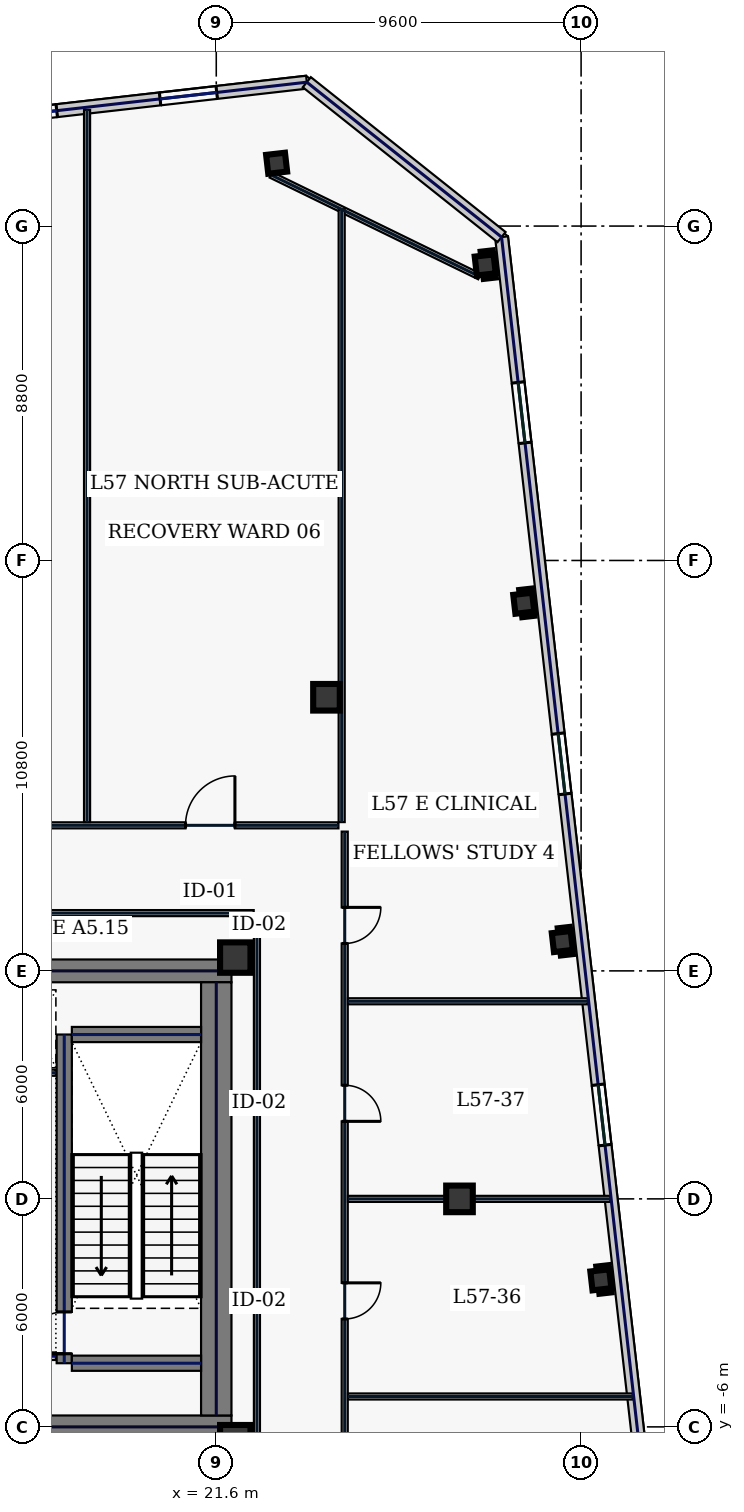
"""IFC4 building model, lengths in metres.
Left out: names, types, materials, properties, quantities, classifications, styles, units other than length and angle.
Written with IfcOpenShell. Run it as: python <this file> out.ifc"""

import sys

from ifc_helpers import new_model, si_unit, direction, frame, frame_2d, origin, origin_2d, place, context, subcontext, project, spatial, rectangle, hollow_rectangle, extrude, element, fill, save


model = new_model("IFC4")
c1 = context("Model", 3, precision=1e-05, world=origin(), true_north=direction((0.0, 1.0)))
c2 = subcontext(c1, "Body", "Model", "MODEL_VIEW")
j1 = project(units=[si_unit("LENGTHUNIT", "METRE"), si_unit("PLANEANGLEUNIT", "RADIAN")], contexts=[c1])
p1 = place(None, origin())
s1 = spatial("IfcSite", under=j1, at=p1, CompositionType="ELEMENT")
p2 = place(p1, origin())
s2 = spatial("IfcBuilding", under=s1, at=p2, CompositionType="ELEMENT")
p3 = place(p2, frame((0.0, 0.0, 247.0)))
s3 = spatial("IfcBuildingStorey", under=s2, at=p3, CompositionType="ELEMENT", Elevation=247.0)
for number, where, z_axis, x_axis in (
    (1, (10.5, 6.0, 0.0), (0.0, 0.0, 1.0), (1.0, 0.0, 0.0)),
    (2, (10.5, -6.0, 0.0), (0.0, 0.0, 1.0), (1.0, 0.0, 0.0)),
):
    element("IfcWall", number, at=place(p3, frame(where, z_axis=z_axis, x_axis=x_axis)), inside=s3, PredefinedType="SHEAR", context=c2, shape_type="SweptSolid", body=[
        extrude(rectangle(XDim=11.5, YDim=0.6, at=frame_2d((5.75, 0.0))), origin(), (0.0, 0.0, 1.0), 3.74),
    ])
p4 = place(p3, frame((21.6, -5.7, 0.0), z_axis=(0.0, 0.0, 1.0), x_axis=(0.0, 1.0, 0.0)))
e3 = element("IfcWall", 3, at=p4, inside=s3, PredefinedType="SHEAR", context=c2, shape_type="SweptSolid", body=[
    extrude(rectangle(XDim=11.4, YDim=0.8, at=frame_2d((5.7, 0.0))), origin(), (0.0, 0.0, 1.0), 3.74),
])
p5 = place(p3, frame((17.6, -4.325, 0.0), z_axis=(0.0, 0.0, 1.0), x_axis=(0.0, 1.0, 0.0)))
e4 = element("IfcWall", 4, at=p5, inside=s3, PredefinedType="SHEAR", context=c2, shape_type="SweptSolid", body=[
    extrude(rectangle(XDim=8.65, YDim=0.4, at=frame_2d((4.325, 0.0))), origin(), (0.0, 0.0, 1.0), 3.74),
])
p6 = place(p5, frame((0.25, 0.0, 0.0)))
e5 = element("IfcOpeningElement", 5, at=p6, cuts=e4, PredefinedType="OPENING", context=c2, shape_type="SweptSolid", body=[
    extrude(rectangle(XDim=1.1, YDim=2.2, at=frame_2d((0.55, 1.1))), frame((0.0, 0.21, 0.0), z_axis=(0.0, -1.0, 0.0), x_axis=(1.0, 0.0, 0.0)), (0.0, 0.0, 1.0), 0.42),
])
for number, where, z_axis, x_axis in (
    (6, (17.8, -4.325, 0.0), (0.0, 0.0, 1.0), (1.0, 0.0, 0.0)),
    (7, (17.8, 4.325, 0.0), (0.0, 0.0, 1.0), (1.0, 0.0, 0.0)),
):
    element("IfcWall", number, at=place(p3, frame(where, z_axis=z_axis, x_axis=x_axis)), inside=s3, PredefinedType="SHEAR", context=c2, shape_type="SweptSolid", body=[
        extrude(rectangle(XDim=3.4, YDim=0.4, at=frame_2d((1.7, 0.0))), origin(), (0.0, 0.0, 1.0), 3.74),
    ])
for number, where, z_axis, x_axis in (
    (8, (22.1, -6.35, 0.0), (0.0, 0.0, 1.0), (1.0, 0.0, 0.0)),
    (9, (22.1, 6.35, 0.0), (0.0, 0.0, 1.0), (1.0, 0.0, 0.0)),
):
    element("IfcColumn", number, at=place(p3, frame(where, z_axis=z_axis, x_axis=x_axis)), inside=s3, PredefinedType="COLUMN", context=c2, shape_type="SweptSolid", body=[
        extrude(hollow_rectangle(XDim=0.8, YDim=0.8, WallThickness=0.036, at=origin_2d()), origin(), (0.0, 0.0, 1.0), 3.74),
    ])
for number, where, z_axis, x_axis in (
    (10, (24.5, 13.2, 0.0), (0.0, 0.0, 1.0), (1.0, 0.0, 0.0)),
    (11, (28.0, 0.0, 0.0), (0.0, 0.0, 1.0), (1.0, 0.0, 0.0)),
):
    element("IfcColumn", number, at=place(p3, frame(where, z_axis=z_axis, x_axis=x_axis)), inside=s3, PredefinedType="COLUMN", context=c2, shape_type="SweptSolid", body=[
        extrude(hollow_rectangle(XDim=0.7, YDim=0.7, WallThickness=0.032, at=origin_2d()), origin(), (0.0, 0.0, 1.0), 3.74),
    ])
for number, where, z_axis, x_axis in (
    (12, (23.188, 27.253, 0.0), (0.0, 0.0, 1.0), (0.994, 0.113, 0.0)),
    (13, (31.72, -2.131, 0.0), (0.0, 0.0, 1.0), (0.994, 0.113, 0.0)),
    (14, (30.706, 6.772, 0.0), (0.0, 0.0, 1.0), (0.994, 0.113, 0.0)),
    (15, (29.691, 15.674, 0.0), (0.0, 0.0, 1.0), (0.994, 0.113, 0.0)),
    (16, (28.677, 24.577, 0.0), (0.0, 0.0, 1.0), (0.994, 0.113, 0.0)),
):
    element("IfcColumn", number, at=place(p3, frame(where, z_axis=z_axis, x_axis=x_axis)), inside=s3, PredefinedType="COLUMN", context=c2, shape_type="SweptSolid", body=[
        extrude(hollow_rectangle(XDim=0.5, YDim=0.5, WallThickness=0.025, at=origin_2d()), origin(), (0.0, 0.0, 1.0), 3.74),
    ])
p7 = place(p3, frame((23.983, 29.386, 0.0), z_axis=(0.0, 0.0, 1.0), x_axis=(-0.993572041858, -0.113201579666, 0.0)))
e17 = element("IfcWall", 17, at=p7, inside=s3, PredefinedType="STANDARD", context=c2, shape_type="SweptSolid", body=[
    extrude(rectangle(XDim=14.15, YDim=0.34, at=frame_2d((7.075, 0.0))), origin(), (0.0, 0.0, 1.0), 3.74),
])
p8 = place(p7, frame((10.279, 0.0, 0.83)))
e18 = element("IfcOpeningElement", 18, at=p8, cuts=e17, PredefinedType="OPENING", context=c2, shape_type="SweptSolid", body=[
    extrude(rectangle(XDim=1.5, YDim=2.0, at=frame_2d((0.75, 1.0))), frame((0.0, 0.18, 0.0), z_axis=(0.0, -1.0, 0.0), x_axis=(1.0, 0.0, 0.0)), (0.0, 0.0, 1.0), 0.36),
])
p9 = place(p7, frame((6.623, 0.0, 0.83)))
e19 = element("IfcOpeningElement", 19, at=p9, cuts=e17, PredefinedType="OPENING", context=c2, shape_type="SweptSolid", body=[
    extrude(rectangle(XDim=0.85, YDim=1.85, at=frame_2d((0.425, 0.925))), frame((0.0, 0.18, 0.0), z_axis=(0.0, -1.0, 0.0), x_axis=(1.0, 0.0, 0.0)), (0.0, 0.0, 1.0), 0.36),
])
p10 = place(p7, frame((2.386, 0.0, 0.83)))
e20 = element("IfcOpeningElement", 20, at=p10, cuts=e17, PredefinedType="OPENING", context=c2, shape_type="SweptSolid", body=[
    extrude(rectangle(XDim=1.5, YDim=2.0, at=frame_2d((0.75, 1.0))), frame((0.0, 0.18, 0.0), z_axis=(0.0, -1.0, 0.0), x_axis=(1.0, 0.0, 0.0)), (0.0, 0.0, 1.0), 0.36),
])
p11 = place(p3, frame((33.318, -11.651, 0.0), z_axis=(0.0, 0.0, 1.0), x_axis=(-0.11320360501, 0.9935718111, 0.0)))
e21 = element("IfcWall", 21, at=p11, inside=s3, PredefinedType="STANDARD", context=c2, shape_type="SweptSolid", body=[
    extrude(rectangle(XDim=37.2, YDim=0.34, at=frame_2d((18.6, 0.0))), origin(), (0.0, 0.0, 1.0), 3.74),
])
p12 = place(p11, frame((3.85, 0.0, 0.58)))
e22 = element("IfcOpeningElement", 22, at=p12, cuts=e21, PredefinedType="OPENING", context=c2, shape_type="SweptSolid", body=[
    extrude(rectangle(XDim=1.6, YDim=2.3, at=frame_2d((0.8, 1.15))), frame((0.0, 0.18, 0.0), z_axis=(0.0, -1.0, 0.0), x_axis=(1.0, 0.0, 0.0)), (0.0, 0.0, 1.0), 0.36),
])
p13 = place(p11, frame((13.15, 0.0, 0.58)))
e23 = element("IfcOpeningElement", 23, at=p13, cuts=e21, PredefinedType="OPENING", context=c2, shape_type="SweptSolid", body=[
    extrude(rectangle(XDim=1.6, YDim=2.3, at=frame_2d((0.8, 1.15))), frame((0.0, 0.18, 0.0), z_axis=(0.0, -1.0, 0.0), x_axis=(1.0, 0.0, 0.0)), (0.0, 0.0, 1.0), 0.36),
])
p14 = place(p11, frame((22.45, 0.0, 0.58)))
e24 = element("IfcOpeningElement", 24, at=p14, cuts=e21, PredefinedType="OPENING", context=c2, shape_type="SweptSolid", body=[
    extrude(rectangle(XDim=1.6, YDim=2.3, at=frame_2d((0.8, 1.15))), frame((0.0, 0.18, 0.0), z_axis=(0.0, -1.0, 0.0), x_axis=(1.0, 0.0, 0.0)), (0.0, 0.0, 1.0), 0.36),
])
p15 = place(p11, frame((31.75, 0.0, 0.58)))
e25 = element("IfcOpeningElement", 25, at=p15, cuts=e21, PredefinedType="OPENING", context=c2, shape_type="SweptSolid", body=[
    extrude(rectangle(XDim=1.6, YDim=2.3, at=frame_2d((0.8, 1.15))), frame((0.0, 0.18, 0.0), z_axis=(0.0, -1.0, 0.0), x_axis=(1.0, 0.0, 0.0)), (0.0, 0.0, 1.0), 0.36),
])
p16 = place(p3, frame((29.107, 25.31, 0.0), z_axis=(0.0, 0.0, 1.0), x_axis=(-0.78259733853, 0.62252823689, 0.0)))
e26 = element("IfcWall", 26, at=p16, inside=s3, PredefinedType="STANDARD", context=c2, shape_type="SweptSolid", body=[
    extrude(rectangle(XDim=6.548, YDim=0.34, at=frame_2d((3.274, 0.0))), origin(), (0.0, 0.0, 1.0), 3.74),
])
p17 = place(p3, frame((15.725, 3.32, 0.0), z_axis=(0.0, 0.0, 1.0), x_axis=(1.0, 0.0, 0.0)))
e27 = element("IfcWall", 27, at=p17, inside=s3, PredefinedType="PARTITIONING", context=c2, shape_type="SweptSolid", body=[
    extrude(rectangle(XDim=1.655, YDim=0.16, at=frame_2d((0.827, 0.0))), origin(), (0.0, 0.0, 1.0), 3.74),
])
p18 = place(p3, frame((14.825, -4.14, 0.0), z_axis=(0.0, 0.0, 1.0), x_axis=(1.0, 0.0, 0.0)))
e28 = element("IfcWall", 28, at=p18, inside=s3, PredefinedType="SOLIDWALL", context=c2, shape_type="SweptSolid", body=[
    extrude(rectangle(XDim=2.555, YDim=0.2, at=frame_2d((1.277, 0.0))), origin(), (0.0, 0.0, 1.0), 3.74),
])
p19 = place(p18, frame((0.88, 0.0, 0.0)))
e29 = element("IfcOpeningElement", 29, at=p19, cuts=e28, PredefinedType="OPENING", context=c2, shape_type="SweptSolid", body=[
    extrude(rectangle(XDim=0.95, YDim=2.2, at=frame_2d((0.475, 1.1))), frame((0.0, 0.11, 0.0), z_axis=(0.0, -1.0, 0.0), x_axis=(1.0, 0.0, 0.0)), (0.0, 0.0, 1.0), 0.22),
])
p20 = place(p3, frame((28.528, 24.271, 0.0), z_axis=(0.0, 0.0, 1.0), x_axis=(-0.898820692789, 0.438316509173, 0.0)))
e30 = element("IfcWall", 30, at=p20, inside=s3, PredefinedType="PARTITIONING", context=c2, shape_type="SweptSolid", body=[
    extrude(rectangle(XDim=6.107, YDim=0.16, at=frame_2d((3.053, 0.0))), origin(), (0.0, 0.0, 1.0), 3.74),
])
p21 = place(p3, frame((-24.815, 9.83, 0.0), z_axis=(0.0, 0.0, 1.0), x_axis=(1.0, 0.0, 0.0)))
e31 = element("IfcWall", 31, at=p21, inside=s3, PredefinedType="PARTITIONING", context=c2, shape_type="SweptSolid", body=[
    extrude(rectangle(XDim=49.63, YDim=0.16, at=frame_2d((24.815, 0.0))), origin(), (0.0, 0.0, 1.0), 3.74),
])
p22 = place(p21, frame((2.044, 0.0, 0.0)))
e32 = element("IfcOpeningElement", 32, at=p22, cuts=e31, PredefinedType="OPENING", context=c2, shape_type="SweptSolid", body=[
    extrude(rectangle(XDim=0.95, YDim=2.2, at=frame_2d((0.475, 1.1))), frame((0.0, 0.09, 0.0), z_axis=(0.0, -1.0, 0.0), x_axis=(1.0, 0.0, 0.0)), (0.0, 0.0, 1.0), 0.18),
])
p23 = place(p21, frame((8.825, 0.0, 0.0)))
e33 = element("IfcOpeningElement", 33, at=p23, cuts=e31, PredefinedType="OPENING", context=c2, shape_type="SweptSolid", body=[
    extrude(rectangle(XDim=1.3, YDim=2.2, at=frame_2d((0.65, 1.1))), frame((0.0, 0.09, 0.0), z_axis=(0.0, -1.0, 0.0), x_axis=(1.0, 0.0, 0.0)), (0.0, 0.0, 1.0), 0.18),
])
p24 = place(p21, frame((16.4, 0.0, 0.0)))
e34 = element("IfcOpeningElement", 34, at=p24, cuts=e31, PredefinedType="OPENING", context=c2, shape_type="SweptSolid", body=[
    extrude(rectangle(XDim=0.95, YDim=2.2, at=frame_2d((0.475, 1.1))), frame((0.0, 0.09, 0.0), z_axis=(0.0, -1.0, 0.0), x_axis=(1.0, 0.0, 0.0)), (0.0, 0.0, 1.0), 0.18),
])
p25 = place(p21, frame((21.1, 0.0, 0.0)))
e35 = element("IfcOpeningElement", 35, at=p25, cuts=e31, PredefinedType="OPENING", context=c2, shape_type="SweptSolid", body=[
    extrude(rectangle(XDim=1.05, YDim=2.2, at=frame_2d((0.525, 1.1))), frame((0.0, 0.09, 0.0), z_axis=(0.0, -1.0, 0.0), x_axis=(1.0, 0.0, 0.0)), (0.0, 0.0, 1.0), 0.18),
])
p26 = place(p21, frame((26.482, 0.0, 0.0)))
e36 = element("IfcOpeningElement", 36, at=p26, cuts=e31, PredefinedType="OPENING", context=c2, shape_type="SweptSolid", body=[
    extrude(rectangle(XDim=0.95, YDim=2.2, at=frame_2d((0.475, 1.1))), frame((0.0, 0.09, 0.0), z_axis=(0.0, -1.0, 0.0), x_axis=(1.0, 0.0, 0.0)), (0.0, 0.0, 1.0), 0.18),
])
p27 = place(p21, frame((32.548, 0.0, 0.0)))
e37 = element("IfcOpeningElement", 37, at=p27, cuts=e31, PredefinedType="OPENING", context=c2, shape_type="SweptSolid", body=[
    extrude(rectangle(XDim=1.15, YDim=2.2, at=frame_2d((0.575, 1.1))), frame((0.0, 0.09, 0.0), z_axis=(0.0, -1.0, 0.0), x_axis=(1.0, 0.0, 0.0)), (0.0, 0.0, 1.0), 0.18),
])
p28 = place(p21, frame((38.815, 0.0, 0.0)))
e38 = element("IfcOpeningElement", 38, at=p28, cuts=e31, PredefinedType="OPENING", context=c2, shape_type="SweptSolid", body=[
    extrude(rectangle(XDim=1.45, YDim=2.2, at=frame_2d((0.725, 1.1))), frame((0.0, 0.09, 0.0), z_axis=(0.0, -1.0, 0.0), x_axis=(1.0, 0.0, 0.0)), (0.0, 0.0, 1.0), 0.18),
])
p29 = place(p21, frame((45.606, 0.0, 0.0)))
e39 = element("IfcOpeningElement", 39, at=p29, cuts=e31, PredefinedType="OPENING", context=c2, shape_type="SweptSolid", body=[
    extrude(rectangle(XDim=1.3, YDim=2.2, at=frame_2d((0.65, 1.1))), frame((0.0, 0.09, 0.0), z_axis=(0.0, -1.0, 0.0), x_axis=(1.0, 0.0, 0.0)), (0.0, 0.0, 1.0), 0.18),
])
p30 = place(p3, frame((24.98, 9.665, 0.0), z_axis=(0.0, 0.0, 1.0), x_axis=(0.0, -1.0, 0.0)))
e40 = element("IfcWall", 40, at=p30, inside=s3, PredefinedType="PARTITIONING", context=c2, shape_type="SweptSolid", body=[
    extrude(rectangle(XDim=19.28, YDim=0.16, at=frame_2d((9.64, 0.0))), origin(), (0.0, 0.0, 1.0), 3.74),
])
p31 = place(p30, frame((16.531, 0.0, 0.0)))
e41 = element("IfcOpeningElement", 41, at=p31, cuts=e40, PredefinedType="OPENING", context=c2, shape_type="SweptSolid", body=[
    extrude(rectangle(XDim=0.95, YDim=2.2, at=frame_2d((0.475, 1.1))), frame((0.0, 0.09, 0.0), z_axis=(0.0, -1.0, 0.0), x_axis=(1.0, 0.0, 0.0)), (0.0, 0.0, 1.0), 0.18),
])
p32 = place(p30, frame((11.875, 0.0, 0.0)))
e42 = element("IfcOpeningElement", 42, at=p32, cuts=e40, PredefinedType="OPENING", context=c2, shape_type="SweptSolid", body=[
    extrude(rectangle(XDim=0.95, YDim=2.2, at=frame_2d((0.475, 1.1))), frame((0.0, 0.09, 0.0), z_axis=(0.0, -1.0, 0.0), x_axis=(1.0, 0.0, 0.0)), (0.0, 0.0, 1.0), 0.18),
])
p33 = place(p30, frame((6.675, 0.0, 0.0)))
e43 = element("IfcOpeningElement", 43, at=p33, cuts=e40, PredefinedType="OPENING", context=c2, shape_type="SweptSolid", body=[
    extrude(rectangle(XDim=0.95, YDim=2.2, at=frame_2d((0.475, 1.1))), frame((0.0, 0.09, 0.0), z_axis=(0.0, -1.0, 0.0), x_axis=(1.0, 0.0, 0.0)), (0.0, 0.0, 1.0), 0.18),
])
p34 = place(p30, frame((1.994, 0.0, 0.0)))
e44 = element("IfcOpeningElement", 44, at=p34, cuts=e40, PredefinedType="OPENING", context=c2, shape_type="SweptSolid", body=[
    extrude(rectangle(XDim=0.95, YDim=2.2, at=frame_2d((0.475, 1.1))), frame((0.0, 0.09, 0.0), z_axis=(0.0, -1.0, 0.0), x_axis=(1.0, 0.0, 0.0)), (0.0, 0.0, 1.0), 0.18),
])
p35 = place(p3, frame((22.585, 7.52, 0.0), z_axis=(0.0, 0.0, 1.0), x_axis=(-1.0, 0.0, 0.0)))
e45 = element("IfcWall", 45, at=p35, inside=s3, PredefinedType="PARTITIONING", context=c2, shape_type="SweptSolid", body=[
    extrude(rectangle(XDim=11.87, YDim=0.16, at=frame_2d((5.935, 0.0))), origin(), (0.0, 0.0, 1.0), 3.74),
])
p36 = place(p3, frame((22.67, -7.385, 0.0), z_axis=(0.0, 0.0, 1.0), x_axis=(0.0, 1.0, 0.0)))
e46 = element("IfcWall", 46, at=p36, inside=s3, PredefinedType="PARTITIONING", context=c2, shape_type="SweptSolid", body=[
    extrude(rectangle(XDim=14.82, YDim=0.16, at=frame_2d((7.41, 0.0))), origin(), (0.0, 0.0, 1.0), 3.74),
])
p37 = place(p3, frame((24.9, 9.915, 0.0), z_axis=(0.0, 0.0, 1.0), x_axis=(0.0, 1.0, 0.0)))
e47 = element("IfcWall", 47, at=p37, inside=s3, PredefinedType="PARTITIONING", context=c2, shape_type="SweptSolid", body=[
    extrude(rectangle(XDim=16.129, YDim=0.16, at=frame_2d((8.065, 0.0))), origin(), (0.0, 0.0, 1.0), 3.74),
])
p38 = place(p3, frame((18.2, 9.915, 0.0), z_axis=(0.0, 0.0, 1.0), x_axis=(0.0, 1.0, 0.0)))
e48 = element("IfcWall", 48, at=p38, inside=s3, PredefinedType="PARTITIONING", context=c2, shape_type="SweptSolid", body=[
    extrude(rectangle(XDim=18.742, YDim=0.16, at=frame_2d((9.371, 0.0))), origin(), (0.0, 0.0, 1.0), 3.74),
])
p39 = place(p3, frame((25.065, -5.2, 0.0), z_axis=(0.0, 0.0, 1.0), x_axis=(1.0, 0.0, 0.0)))
e49 = element("IfcWall", 49, at=p39, inside=s3, PredefinedType="PARTITIONING", context=c2, shape_type="SweptSolid", body=[
    extrude(rectangle(XDim=7.498, YDim=0.16, at=frame_2d((3.749, 0.0))), origin(), (0.0, 0.0, 1.0), 3.74),
])
p40 = place(p3, frame((25.065, 0.0, 0.0), z_axis=(0.0, 0.0, 1.0), x_axis=(1.0, 0.0, 0.0)))
e50 = element("IfcWall", 50, at=p40, inside=s3, PredefinedType="PARTITIONING", context=c2, shape_type="SweptSolid", body=[
    extrude(rectangle(XDim=6.906, YDim=0.16, at=frame_2d((3.453, 0.0))), origin(), (0.0, 0.0, 1.0), 3.74),
])
p41 = place(p3, frame((25.065, 5.2, 0.0), z_axis=(0.0, 0.0, 1.0), x_axis=(1.0, 0.0, 0.0)))
e51 = element("IfcWall", 51, at=p41, inside=s3, PredefinedType="PARTITIONING", context=c2, shape_type="SweptSolid", body=[
    extrude(rectangle(XDim=6.313, YDim=0.16, at=frame_2d((3.157, 0.0))), origin(), (0.0, 0.0, 1.0), 3.74),
])
p42 = place(p9, origin())
e52 = element("IfcWindow", 52, at=p42, inside=s3, PartitioningType="SINGLE_PANEL", PredefinedType="WINDOW", context=c2, shape_type="SweptSolid", body=[
    extrude(rectangle(XDim=0.85, YDim=1.85, at=frame_2d((0.425, 0.925))), frame((0.0, 0.03, 0.0), z_axis=(0.0, -1.0, 0.0), x_axis=(1.0, 0.0, 0.0)), (0.0, 0.0, 1.0), 0.06),
])
fill(e19, e52)
p43 = place(p10, origin())
e53 = element("IfcWindow", 53, at=p43, inside=s3, PartitioningType="SINGLE_PANEL", PredefinedType="WINDOW", context=c2, shape_type="SweptSolid", body=[
    extrude(rectangle(XDim=1.5, YDim=2.0, at=frame_2d((0.75, 1.0))), frame((0.0, 0.03, 0.0), z_axis=(0.0, -1.0, 0.0), x_axis=(1.0, 0.0, 0.0)), (0.0, 0.0, 1.0), 0.06),
])
fill(e20, e53)
p44 = place(p13, origin())
e54 = element("IfcWindow", 54, at=p44, inside=s3, PartitioningType="SINGLE_PANEL", PredefinedType="WINDOW", context=c2, shape_type="SweptSolid", body=[
    extrude(rectangle(XDim=1.6, YDim=2.3, at=frame_2d((0.8, 1.15))), frame((0.0, 0.03, 0.0), z_axis=(0.0, -1.0, 0.0), x_axis=(1.0, 0.0, 0.0)), (0.0, 0.0, 1.0), 0.06),
])
fill(e23, e54)
p45 = place(p14, origin())
e55 = element("IfcWindow", 55, at=p45, inside=s3, PartitioningType="SINGLE_PANEL", PredefinedType="WINDOW", context=c2, shape_type="SweptSolid", body=[
    extrude(rectangle(XDim=1.6, YDim=2.3, at=frame_2d((0.8, 1.15))), frame((0.0, 0.03, 0.0), z_axis=(0.0, -1.0, 0.0), x_axis=(1.0, 0.0, 0.0)), (0.0, 0.0, 1.0), 0.06),
])
fill(e24, e55)
p46 = place(p15, origin())
e56 = element("IfcWindow", 56, at=p46, inside=s3, PartitioningType="SINGLE_PANEL", PredefinedType="WINDOW", context=c2, shape_type="SweptSolid", body=[
    extrude(rectangle(XDim=1.6, YDim=2.3, at=frame_2d((0.8, 1.15))), frame((0.0, 0.03, 0.0), z_axis=(0.0, -1.0, 0.0), x_axis=(1.0, 0.0, 0.0)), (0.0, 0.0, 1.0), 0.06),
])
fill(e25, e56)
p47 = place(p6, origin())
e57 = element("IfcDoor", 57, at=p47, inside=s3, OperationType="SINGLE_SWING_LEFT", PredefinedType="DOOR", context=c2, shape_type="SweptSolid", body=[
    extrude(rectangle(XDim=1.1, YDim=2.2, at=frame_2d((0.55, 1.1))), frame((0.0, 0.025, 0.0), z_axis=(0.0, -1.0, 0.0), x_axis=(1.0, 0.0, 0.0)), (0.0, 0.0, 1.0), 0.05),
])
fill(e5, e57)
p48 = place(p29, origin())
e58 = element("IfcDoor", 58, at=p48, inside=s3, OperationType="SINGLE_SWING_RIGHT", PredefinedType="DOOR", context=c2, shape_type="SweptSolid", body=[
    extrude(rectangle(XDim=1.3, YDim=2.2, at=frame_2d((0.65, 1.1))), frame((0.0, 0.025, 0.0), z_axis=(0.0, -1.0, 0.0), x_axis=(1.0, 0.0, 0.0)), (0.0, 0.0, 1.0), 0.05),
])
fill(e39, e58)
p49 = place(p32, origin())
e59 = element("IfcDoor", 59, at=p49, inside=s3, OperationType="SINGLE_SWING_LEFT", PredefinedType="DOOR", context=c2, shape_type="SweptSolid", body=[
    extrude(rectangle(XDim=0.95, YDim=2.2, at=frame_2d((0.475, 1.1))), frame((0.0, 0.025, 0.0), z_axis=(0.0, -1.0, 0.0), x_axis=(1.0, 0.0, 0.0)), (0.0, 0.0, 1.0), 0.05),
])
fill(e42, e59)
p50 = place(p33, origin())
e60 = element("IfcDoor", 60, at=p50, inside=s3, OperationType="SINGLE_SWING_RIGHT", PredefinedType="DOOR", context=c2, shape_type="SweptSolid", body=[
    extrude(rectangle(XDim=0.95, YDim=2.2, at=frame_2d((0.475, 1.1))), frame((0.0, 0.025, 0.0), z_axis=(0.0, -1.0, 0.0), x_axis=(1.0, 0.0, 0.0)), (0.0, 0.0, 1.0), 0.05),
])
fill(e43, e60)
p51 = place(p34, origin())
e61 = element("IfcDoor", 61, at=p51, inside=s3, OperationType="SINGLE_SWING_LEFT", PredefinedType="DOOR", context=c2, shape_type="SweptSolid", body=[
    extrude(rectangle(XDim=0.95, YDim=2.2, at=frame_2d((0.475, 1.1))), frame((0.0, 0.025, 0.0), z_axis=(0.0, -1.0, 0.0), x_axis=(1.0, 0.0, 0.0)), (0.0, 0.0, 1.0), 0.05),
])
fill(e44, e61)
save(model, sys.argv[1])
